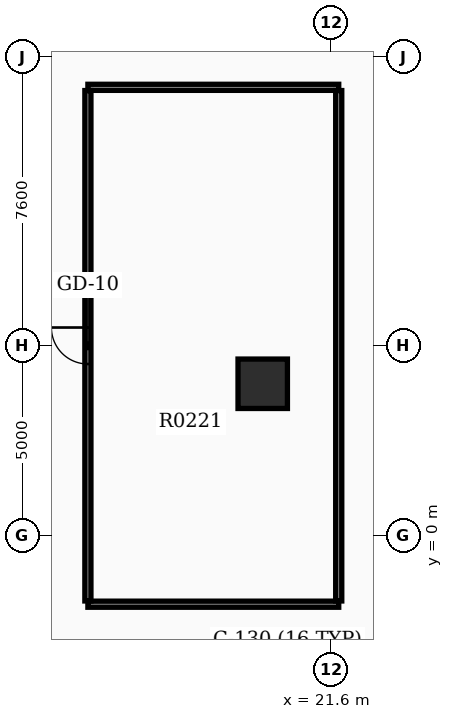
"""IFC4 building model, lengths in metres.
Left out: names, types, materials, properties, quantities, classifications, styles, units other than length and angle.
Written with IfcOpenShell. Run it as: python <this file> out.ifc"""

import sys

from ifc_helpers import new_model, si_unit, direction, frame, frame_2d, origin, origin_2d, place, context, subcontext, project, spatial, rectangle, extrude, element, fill, save


model = new_model("IFC4")
c1 = context("Model", 3, precision=1e-05, world=origin(), true_north=direction((0.0, 1.0)))
c2 = subcontext(c1, "Body", "Model", "MODEL_VIEW")
j1 = project(units=[si_unit("LENGTHUNIT", "METRE"), si_unit("PLANEANGLEUNIT", "RADIAN")], contexts=[c1])
p1 = place(None, origin())
s1 = spatial("IfcSite", under=j1, at=p1, CompositionType="ELEMENT")
p2 = place(p1, origin())
s2 = spatial("IfcBuilding", under=s1, at=p2, CompositionType="ELEMENT")
p3 = place(p2, frame((0.0, 0.0, 14.7)))
s3 = spatial("IfcBuildingStorey", under=s2, at=p3, CompositionType="ELEMENT", Elevation=14.7)
p4 = place(p3, frame((19.8, 4.0, 0.0), z_axis=(0.0, 0.0, 1.0), x_axis=(1.0, 0.0, 0.0)))
e1 = element("IfcColumn", 1, at=p4, inside=s3, PredefinedType="COLUMN", context=c2, shape_type="SweptSolid", body=[
    extrude(rectangle(XDim=1.3, YDim=1.3, at=origin_2d()), origin(), (0.0, 0.0, 1.0), 4.5),
])
for number, where, z_axis, x_axis in (
    (2, (15.2, -1.8, 0.0), (0.0, 0.0, 1.0), (1.0, 0.0, 0.0)),
    (3, (15.2, 11.8, 0.0), (0.0, 0.0, 1.0), (1.0, 0.0, 0.0)),
):
    element("IfcWall", number, at=place(p3, frame(where, z_axis=z_axis, x_axis=x_axis)), inside=s3, PredefinedType="PARTITIONING", context=c2, shape_type="SweptSolid", body=[
        extrude(rectangle(XDim=6.6, YDim=0.16, at=frame_2d((3.3, 0.0))), origin(), (0.0, 0.0, 1.0), 3.32),
    ])
p5 = place(p3, frame((15.2, -1.715, 0.0), z_axis=(0.0, 0.0, 1.0), x_axis=(0.0, 1.0, 0.0)))
e4 = element("IfcWall", 4, at=p5, inside=s3, PredefinedType="PARTITIONING", context=c2, shape_type="SweptSolid", body=[
    extrude(rectangle(XDim=13.43, YDim=0.16, at=frame_2d((6.715, 0.0))), origin(), (0.0, 0.0, 1.0), 3.32),
])
p6 = place(p5, frame((6.235, 0.0, 0.0)))
e5 = element("IfcOpeningElement", 5, at=p6, cuts=e4, PredefinedType="OPENING", context=c2, shape_type="SweptSolid", body=[
    extrude(rectangle(XDim=0.96, YDim=2.15, at=frame_2d((0.48, 1.075))), frame((0.0, 0.09, 0.0), z_axis=(0.0, -1.0, 0.0), x_axis=(1.0, 0.0, 0.0)), (0.0, 0.0, 1.0), 0.18),
])
p7 = place(p3, frame((21.8, -1.715, 0.0), z_axis=(0.0, 0.0, 1.0), x_axis=(0.0, 1.0, 0.0)))
e6 = element("IfcWall", 6, at=p7, inside=s3, PredefinedType="PARTITIONING", context=c2, shape_type="SweptSolid", body=[
    extrude(rectangle(XDim=13.43, YDim=0.16, at=frame_2d((6.715, 0.0))), origin(), (0.0, 0.0, 1.0), 3.32),
])
p8 = place(p6, origin())
e7 = element("IfcDoor", 7, at=p8, inside=s3, OperationType="SINGLE_SWING_RIGHT", PredefinedType="DOOR", context=c2, shape_type="SweptSolid", body=[
    extrude(rectangle(XDim=0.96, YDim=2.15, at=frame_2d((0.48, 1.075))), frame((0.0, 0.025, 0.0), z_axis=(0.0, -1.0, 0.0), x_axis=(1.0, 0.0, 0.0)), (0.0, 0.0, 1.0), 0.05),
])
fill(e5, e7)
save(model, sys.argv[1])
